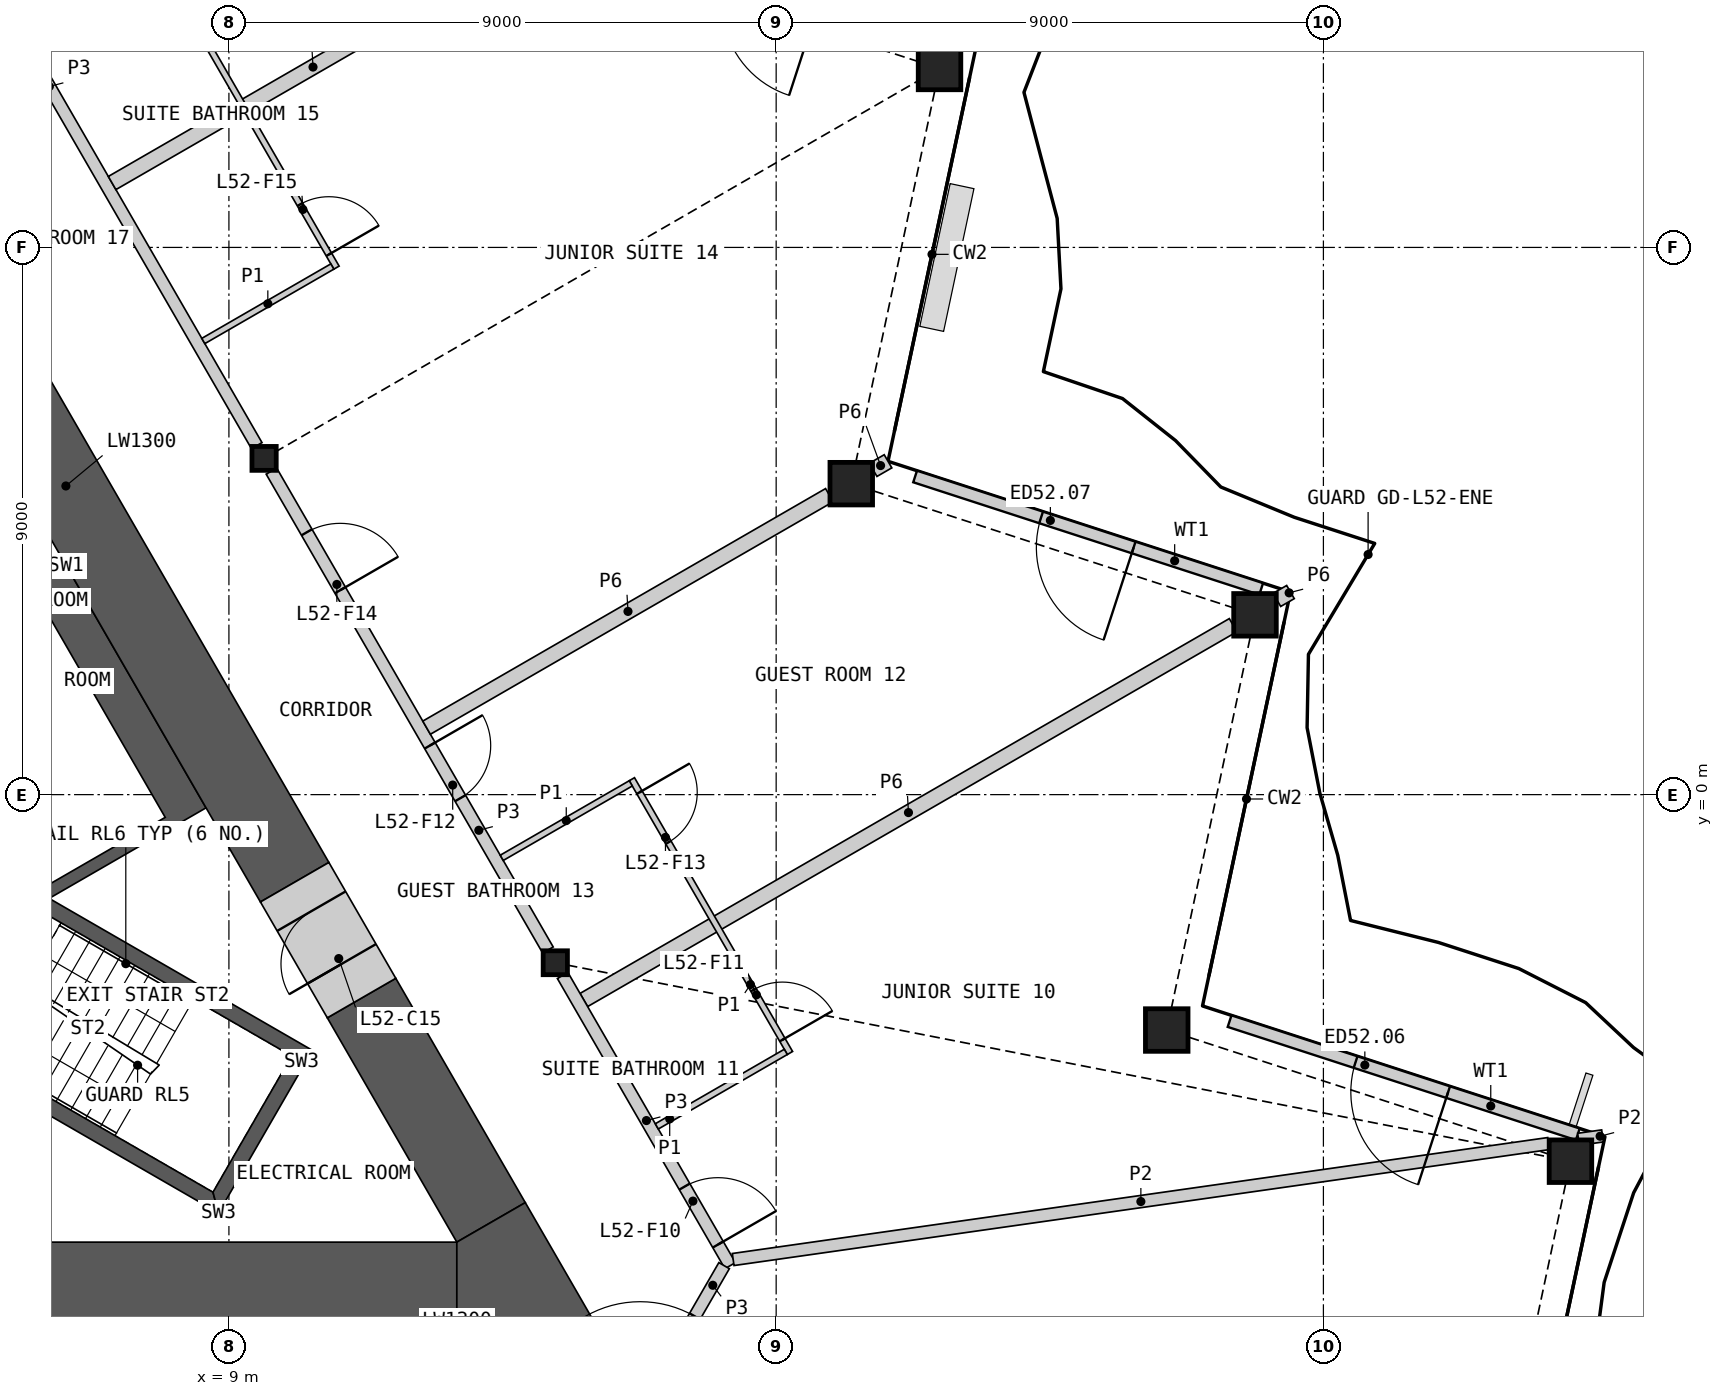
"""IFC4 building model, lengths in metres.
Left out: names, types, materials, properties, quantities, classifications, styles, units other than length and angle.
Written with IfcOpenShell. Run it as: python <this file> out.ifc"""

import sys

from ifc_helpers import new_model, si_unit, direction, frame, frame_2d, origin, origin_2d, place, context, subcontext, project, spatial, polyline, rectangle, hollow_rectangle, i_section, outline, extrude, element, fill, save


model = new_model("IFC4")
c1 = context("Model", 3, precision=1e-05, world=origin(), true_north=direction((0.0, 1.0)))
c2 = subcontext(c1, "Body", "Model", "MODEL_VIEW")
j1 = project(units=[si_unit("LENGTHUNIT", "METRE"), si_unit("PLANEANGLEUNIT", "RADIAN")], contexts=[c1])
p1 = place(None, origin())
s1 = spatial("IfcSite", under=j1, at=p1, CompositionType="ELEMENT")
p2 = place(p1, origin())
s2 = spatial("IfcBuilding", under=s1, at=p2, CompositionType="ELEMENT")
p3 = place(p2, frame((0.0, 0.0, 238.2)))
s3 = spatial("IfcBuildingStorey", under=s2, at=p3, CompositionType="ELEMENT", Elevation=238.2)
for number, where, z_axis, x_axis in (
    (1, (31.063, -6.029, 0.0), (0.0, 0.0, 1.0), (1.0, 0.0, 0.0)),
    (2, (24.423, -3.872, 0.0), (0.0, 0.0, 1.0), (1.0, 0.0, 0.0)),
    (3, (25.875, 2.957, 0.0), (0.0, 0.0, 1.0), (1.0, 0.0, 0.0)),
    (4, (19.235, 5.115, 0.0), (0.0, 0.0, 1.0), (1.0, 0.0, 0.0)),
    (5, (20.687, 11.943, 0.0), (0.0, 0.0, 1.0), (1.0, 0.0, 0.0)),
):
    element("IfcColumn", number, at=place(p3, frame(where, z_axis=z_axis, x_axis=x_axis)), inside=s3, PredefinedType="COLUMN", context=c2, shape_type="SweptSolid", body=[
        extrude(hollow_rectangle(XDim=0.7, YDim=0.7, WallThickness=0.045, at=origin_2d()), origin(), (0.0, 0.0, 1.0), 3.6),
    ])
for number, where, z_axis, x_axis in (
    (6, (14.368, -2.765, 0.0), (0.0, 0.0, 1.0), (1.0, 0.0, 0.0)),
    (7, (9.578, 5.53, 0.0), (0.0, 0.0, 1.0), (1.0, 0.0, 0.0)),
):
    element("IfcColumn", number, at=place(p3, frame(where, z_axis=z_axis, x_axis=x_axis)), inside=s3, PredefinedType="COLUMN", context=c2, shape_type="SweptSolid", body=[
        extrude(i_section(OverallWidth=0.399, OverallDepth=0.393, WebThickness=0.023, FlangeThickness=0.037, at=origin_2d()), origin(), (0.0, 0.0, 1.0), 3.6),
    ])
p4 = place(p3, frame((31.184, -5.586, 0.0), z_axis=(0.0, 0.0, 1.0), x_axis=(-0.95106415783, 0.30899347516, 0.0)))
e8 = element("IfcWall", 8, at=p4, inside=s3, PredefinedType="SOLIDWALL", context=c2, shape_type="SweptSolid", body=[
    extrude(rectangle(XDim=6.021, YDim=0.2, at=frame_2d((3.011, 0.0))), origin(), (0.0, 0.0, 1.0), 2.701),
])
p5 = place(p4, frame((2.243, 0.0, 0.0)))
e9 = element("IfcOpeningElement", 9, at=p5, cuts=e8, PredefinedType="OPENING", context=c2, shape_type="SweptSolid", body=[
    extrude(rectangle(XDim=1.6, YDim=2.4, at=frame_2d((0.8, 1.2))), frame((0.0, 0.11, 0.0), z_axis=(0.0, -1.0, 0.0), x_axis=(1.0, 0.0, 0.0)), (0.0, 0.0, 1.0), 0.22),
])
p6 = place(p3, frame((25.977, 3.383, 0.0), z_axis=(0.0, 0.0, 1.0), x_axis=(-0.951062846307, 0.308997511922, 0.0)))
e10 = element("IfcWall", 10, at=p6, inside=s3, PredefinedType="SOLIDWALL", context=c2, shape_type="SweptSolid", body=[
    extrude(rectangle(XDim=5.984, YDim=0.2, at=frame_2d((2.992, 0.0))), origin(), (0.0, 0.0, 1.0), 2.701),
])
p7 = place(p6, frame((2.206, 0.0, 0.0)))
e11 = element("IfcOpeningElement", 11, at=p7, cuts=e10, PredefinedType="OPENING", context=c2, shape_type="SweptSolid", body=[
    extrude(rectangle(XDim=1.6, YDim=2.4, at=frame_2d((0.8, 1.2))), frame((0.0, 0.11, 0.0), z_axis=(0.0, -1.0, 0.0), x_axis=(1.0, 0.0, 0.0)), (0.0, 0.0, 1.0), 0.22),
])
p8 = place(p3, origin())
e12 = element("IfcWall", 12, at=p8, inside=s3, PredefinedType="SHEAR", context=c2, shape_type="SweptSolid", body=[
    extrude(outline(polyline([(6.324, 3.767), (8.624, -0.217), (8.231, -0.444), (6.061, -1.697), (5.96, -1.524), (7.952, -0.374), (5.852, 3.263), (3.861, 2.113), (3.76, 2.287), (5.931, 3.54), (6.324, 3.767)])), origin(), (0.0, 0.0, 1.0), 3.25),
])
p9 = place(p3, origin())
e13 = element("IfcWall", 13, at=p9, inside=s3, PredefinedType="SHEAR", context=c2, shape_type="SweptSolid", body=[
    extrude(outline(polyline([(3.763, -3.956), (8.83, -6.881), (8.738, -6.539), (3.888, -3.739), (3.763, -3.956)])), origin(), (0.0, 0.0, 1.0), 3.25),
])
p10 = place(p3, origin())
e14 = element("IfcWall", 14, at=p10, inside=s3, PredefinedType="SHEAR", context=c2, shape_type="SweptSolid", body=[
    extrude(outline(polyline([(8.83, -6.881), (10.374, -4.206), (10.032, -4.298), (8.738, -6.539), (8.83, -6.881)])), origin(), (0.0, 0.0, 1.0), 3.25),
])
p11 = place(p3, origin())
e15 = element("IfcWall", 15, at=p11, inside=s3, PredefinedType="SHEAR", context=c2, shape_type="SweptSolid", body=[
    extrude(outline(polyline([(10.032, -4.298), (10.374, -4.206), (5.307, -1.281), (5.182, -1.498), (10.032, -4.298)])), origin(), (0.0, 0.0, 1.0), 3.25),
])
p12 = place(p3, frame((-12.748, -8.01, 0.0), z_axis=(0.0, 0.0, 1.0), x_axis=(1.0, 0.0, 0.0)))
e16 = element("IfcWall", 16, at=p12, inside=s3, PredefinedType="SHEAR", context=c2, shape_type="SweptSolid", body=[
    extrude(rectangle(XDim=25.497, YDim=1.3, at=frame_2d((12.748, 0.0))), origin(), (0.0, 0.0, 1.0), 3.25),
])
p13 = place(p3, frame((10.081, -1.441, 0.0), z_axis=(0.0, 0.0, 1.0), x_axis=(-0.500012180433, 0.866018371294, 0.0)))
e17 = element("IfcWall", 17, at=p13, inside=s3, PredefinedType="SHEAR", context=c2, shape_type="SweptSolid", body=[
    extrude(rectangle(XDim=15.05, YDim=1.3, at=frame_2d((7.525, 0.0))), origin(), (0.0, 0.0, 1.0), 3.25),
])
p14 = place(p3, frame((13.311, -7.035, 0.0), z_axis=(0.0, 0.0, 1.0), x_axis=(-0.500003555838, 0.866023350811, 0.0)))
e18 = element("IfcWall", 18, at=p14, inside=s3, PredefinedType="SHEAR", context=c2, shape_type="SweptSolid", body=[
    extrude(rectangle(XDim=4.26, YDim=1.3, at=frame_2d((2.13, 0.0))), origin(), (0.0, 0.0, 1.0), 3.25),
])
p15 = place(p3, origin())
e19 = element("IfcWall", 19, at=p15, inside=s3, PredefinedType="SHEAR", context=c2, shape_type="SweptSolid", body=[
    extrude(outline(polyline([(12.748, -8.66), (12.748, -7.36), (13.874, -6.71), (15.0, -8.66), (12.748, -8.66)])), origin(), (0.0, 0.0, 1.0), 3.25),
])
p16 = place(p3, frame((11.181, -3.346, 0.0), z_axis=(0.0, 0.0, 1.0), x_axis=(-0.499946605688, 0.86605622881, 0.0)))
e20 = element("IfcWall", 20, at=p16, inside=s3, PredefinedType="SHEAR", context=c2, shape_type="SweptSolid", body=[
    extrude(rectangle(XDim=2.2, YDim=1.3, at=frame_2d((1.1, 0.0))), origin(), (0.0, 0.0, 1.0), 3.25),
])
p17 = place(p16, frame((0.65, 0.0, 0.0)))
e21 = element("IfcOpeningElement", 21, at=p17, cuts=e20, PredefinedType="OPENING", context=c2, shape_type="SweptSolid", body=[
    extrude(rectangle(XDim=1.0, YDim=2.1, at=frame_2d((0.5, 1.05))), frame((0.0, 0.66, 0.0), z_axis=(0.0, -1.0, 0.0), x_axis=(1.0, 0.0, 0.0)), (0.0, 0.0, 1.0), 1.32),
])
p18 = place(p3, frame((14.837, -3.378, 0.0), z_axis=(0.0, 0.0, 1.0), x_axis=(0.866021706022, 0.500006404657, 0.0)))
e22 = element("IfcWall", 22, at=p18, inside=s3, PredefinedType="PARTITIONING", context=c2, shape_type="SweptSolid", body=[
    extrude(rectangle(XDim=12.33, YDim=0.25, at=frame_2d((6.165, 0.0))), origin(), (0.0, 0.0, 1.0), 2.404),
])
p19 = place(p3, frame((9.699, 5.321, 0.0), z_axis=(0.0, 0.0, 1.0), x_axis=(0.49998193945, -0.866035830797, 0.0)))
e23 = element("IfcWall", 23, at=p19, inside=s3, PredefinedType="PARTITIONING", context=c2, shape_type="SweptSolid", body=[
    extrude(rectangle(XDim=9.094, YDim=0.2, at=frame_2d((4.547, 0.0))), origin(), (0.0, 0.0, 1.0), 3.25),
])
p20 = place(p19, frame((5.212, 0.0, 0.0)))
e24 = element("IfcOpeningElement", 24, at=p20, cuts=e23, PredefinedType="OPENING", context=c2, shape_type="SweptSolid", body=[
    extrude(rectangle(XDim=1.0, YDim=2.1, at=frame_2d((0.5, 1.05))), frame((0.0, 0.11, 0.0), z_axis=(0.0, -1.0, 0.0), x_axis=(1.0, 0.0, 0.0)), (0.0, 0.0, 1.0), 0.22),
])
p21 = place(p19, frame((1.162, 0.0, 0.0)))
e25 = element("IfcOpeningElement", 25, at=p21, cuts=e23, PredefinedType="OPENING", context=c2, shape_type="SweptSolid", body=[
    extrude(rectangle(XDim=1.1, YDim=2.1, at=frame_2d((0.55, 1.05))), frame((0.0, 0.11, 0.0), z_axis=(0.0, -1.0, 0.0), x_axis=(1.0, 0.0, 0.0)), (0.0, 0.0, 1.0), 0.22),
])
p22 = place(p3, frame((4.91, 13.616, 0.0), z_axis=(0.0, 0.0, 1.0), x_axis=(0.50000207303, -0.866024206917, 0.0)))
e26 = element("IfcWall", 26, at=p22, inside=s3, PredefinedType="PARTITIONING", context=c2, shape_type="SweptSolid", body=[
    extrude(rectangle(XDim=9.095, YDim=0.2, at=frame_2d((4.547, 0.0))), origin(), (0.0, 0.0, 1.0), 3.25),
])
p23 = place(p3, frame((12.251, 1.101, 0.0), z_axis=(0.0, 0.0, 1.0), x_axis=(0.866020808234, 0.500007959642, 0.0)))
e27 = element("IfcWall", 27, at=p23, inside=s3, PredefinedType="PARTITIONING", context=c2, shape_type="SweptSolid", body=[
    extrude(rectangle(XDim=7.649, YDim=0.25, at=frame_2d((3.824, 0.0))), origin(), (0.0, 0.0, 1.0), 2.404),
])
p24 = place(p3, frame((7.079, 10.059, 0.0), z_axis=(0.0, 0.0, 1.0), x_axis=(0.866033195618, 0.499986503906, 0.0)))
e28 = element("IfcWall", 28, at=p24, inside=s3, PredefinedType="PARTITIONING", context=c2, shape_type="SweptSolid", body=[
    extrude(rectangle(XDim=7.63, YDim=0.25, at=frame_2d((3.815, 0.0))), origin(), (0.0, 0.0, 1.0), 2.404),
])
p25 = place(p3, frame((14.489, -2.975, 0.0), z_axis=(0.0, 0.0, 1.0), x_axis=(0.500017753321, -0.866015153657, 0.0)))
e29 = element("IfcWall", 29, at=p25, inside=s3, PredefinedType="PARTITIONING", context=c2, shape_type="SweptSolid", body=[
    extrude(rectangle(XDim=5.51, YDim=0.2, at=frame_2d((2.755, 0.0))), origin(), (0.0, 0.0, 1.0), 3.25),
])
p26 = place(p25, frame((4.01, 0.0, 0.0)))
e30 = element("IfcOpeningElement", 30, at=p26, cuts=e29, PredefinedType="OPENING", context=c2, shape_type="SweptSolid", body=[
    extrude(rectangle(XDim=1.1, YDim=2.1, at=frame_2d((0.55, 1.05))), frame((0.0, 0.11, 0.0), z_axis=(0.0, -1.0, 0.0), x_axis=(1.0, 0.0, 0.0)), (0.0, 0.0, 1.0), 0.22),
])
p27 = place(p3, frame((15.281, -10.974, 0.0), z_axis=(0.0, 0.0, 1.0), x_axis=(0.499958791762, 0.866049194065, 0.0)))
e31 = element("IfcWall", 31, at=p27, inside=s3, PredefinedType="PARTITIONING", context=c2, shape_type="SweptSolid", body=[
    extrude(rectangle(XDim=3.726, YDim=0.2, at=frame_2d((1.863, 0.0))), origin(), (0.0, 0.0, 1.0), 3.25),
])
p28 = place(p27, frame((0.963, 0.0, 0.0)))
e32 = element("IfcOpeningElement", 32, at=p28, cuts=e31, PredefinedType="OPENING", context=c2, shape_type="SweptSolid", body=[
    extrude(rectangle(XDim=1.8, YDim=2.1, at=frame_2d((0.9, 1.05))), frame((0.0, 0.11, 0.0), z_axis=(0.0, -1.0, 0.0), x_axis=(1.0, 0.0, 0.0)), (0.0, 0.0, 1.0), 0.22),
])
p29 = place(p3, frame((19.595, 5.341, 0.0), z_axis=(0.0, 0.0, 1.0), x_axis=(0.865998287773, 0.500046963369, 0.0)))
e33 = element("IfcWall", 33, at=p29, inside=s3, PredefinedType="PARTITIONING", context=c2, shape_type="SweptSolid", body=[
    extrude(rectangle(XDim=0.282, YDim=0.25, at=frame_2d((0.141, 0.0))), origin(), (0.0, 0.0, 1.0), 2.404),
])
p30 = place(p3, frame((26.235, 3.203, 0.0), z_axis=(0.0, 0.0, 1.0), x_axis=(0.86596515875, 0.500104332946, 0.0)))
e34 = element("IfcWall", 34, at=p30, inside=s3, PredefinedType="PARTITIONING", context=c2, shape_type="SweptSolid", body=[
    extrude(rectangle(XDim=0.258, YDim=0.25, at=frame_2d((0.129, 0.0))), origin(), (0.0, 0.0, 1.0), 2.404),
])
p31 = place(p3, frame((17.293, -7.646, 0.0), z_axis=(0.0, 0.0, 1.0), x_axis=(0.990042285303, 0.140770285614, 0.0)))
e35 = element("IfcWall", 35, at=p31, inside=s3, PredefinedType="PARTITIONING", context=c2, shape_type="SweptSolid", body=[
    extrude(rectangle(XDim=13.545, YDim=0.2, at=frame_2d((6.772, 0.0))), origin(), (0.0, 0.0, 1.0), 2.404),
])
p32 = place(p3, frame((31.196, -5.669, 0.0), z_axis=(0.0, 0.0, 1.0), x_axis=(0.990010701632, 0.140992236146, 0.0)))
e36 = element("IfcWall", 36, at=p32, inside=s3, PredefinedType="PARTITIONING", context=c2, shape_type="SweptSolid", body=[
    extrude(rectangle(XDim=0.398, YDim=0.2, at=frame_2d((0.199, 0.0))), origin(), (0.0, 0.0, 1.0), 2.404),
])
p33 = place(p3, frame((7.719, 13.95, 0.0), z_axis=(0.0, 0.0, 1.0), x_axis=(0.500008851346, -0.866020293397, 0.0)))
e37 = element("IfcWall", 37, at=p33, inside=s3, PredefinedType="PARTITIONING", context=c2, shape_type="SweptSolid", body=[
    extrude(rectangle(XDim=6.1, YDim=0.1, at=frame_2d((3.05, 0.0))), origin(), (0.0, 0.0, 1.0), 2.404),
])
p34 = place(p33, frame((4.9, 0.0, 0.0)))
e38 = element("IfcOpeningElement", 38, at=p34, cuts=e37, PredefinedType="OPENING", context=c2, shape_type="SweptSolid", body=[
    extrude(rectangle(XDim=0.95, YDim=2.1, at=frame_2d((0.475, 1.05))), frame((0.0, 0.06, 0.0), z_axis=(0.0, -1.0, 0.0), x_axis=(1.0, 0.0, 0.0)), (0.0, 0.0, 1.0), 0.12),
])
p35 = place(p33, frame((0.25, 0.0, 0.0)))
e39 = element("IfcOpeningElement", 39, at=p35, cuts=e37, PredefinedType="OPENING", context=c2, shape_type="SweptSolid", body=[
    extrude(rectangle(XDim=0.95, YDim=2.1, at=frame_2d((0.475, 1.05))), frame((0.0, 0.06, 0.0), z_axis=(0.0, -1.0, 0.0), x_axis=(1.0, 0.0, 0.0)), (0.0, 0.0, 1.0), 0.12),
])
p36 = place(p3, frame((15.627, 0.254, 0.0), z_axis=(0.0, 0.0, 1.0), x_axis=(0.500027264788, -0.866009661879, 0.0)))
e40 = element("IfcWall", 40, at=p36, inside=s3, PredefinedType="PARTITIONING", context=c2, shape_type="SweptSolid", body=[
    extrude(rectangle(XDim=5.2, YDim=0.1, at=frame_2d((2.6, 0.0))), origin(), (0.0, 0.0, 1.0), 2.404),
])
p37 = place(p36, frame((4.0, 0.0, 0.0)))
e41 = element("IfcOpeningElement", 41, at=p37, cuts=e40, PredefinedType="OPENING", context=c2, shape_type="SweptSolid", body=[
    extrude(rectangle(XDim=0.95, YDim=2.1, at=frame_2d((0.475, 1.05))), frame((0.0, 0.06, 0.0), z_axis=(0.0, -1.0, 0.0), x_axis=(1.0, 0.0, 0.0)), (0.0, 0.0, 1.0), 0.12),
])
p38 = place(p36, frame((0.25, 0.0, 0.0)))
e42 = element("IfcOpeningElement", 42, at=p38, cuts=e40, PredefinedType="OPENING", context=c2, shape_type="SweptSolid", body=[
    extrude(rectangle(XDim=0.95, YDim=2.1, at=frame_2d((0.475, 1.05))), frame((0.0, 0.06, 0.0), z_axis=(0.0, -1.0, 0.0), x_axis=(1.0, 0.0, 0.0)), (0.0, 0.0, 1.0), 0.12),
])
p39 = place(p3, frame((16.037, -5.456, 0.0), z_axis=(0.0, 0.0, 1.0), x_axis=(0.865989751695, 0.500061746146, 0.0)))
e43 = element("IfcWall", 43, at=p39, inside=s3, PredefinedType="PARTITIONING", context=c2, shape_type="SweptSolid", body=[
    extrude(rectangle(XDim=2.45, YDim=0.1, at=frame_2d((1.225, 0.0))), origin(), (0.0, 0.0, 1.0), 2.404),
])
p40 = place(p3, frame((13.487, -1.04, 0.0), z_axis=(0.0, 0.0, 1.0), x_axis=(0.866032905446, 0.499987006516, 0.0)))
e44 = element("IfcWall", 44, at=p40, inside=s3, PredefinedType="PARTITIONING", context=c2, shape_type="SweptSolid", body=[
    extrude(rectangle(XDim=2.45, YDim=0.1, at=frame_2d((1.225, 0.0))), origin(), (0.0, 0.0, 1.0), 2.404),
])
p41 = place(p3, frame((8.579, 7.461, 0.0), z_axis=(0.0, 0.0, 1.0), x_axis=(0.866014668023, 0.500018594424, 0.0)))
e45 = element("IfcWall", 45, at=p41, inside=s3, PredefinedType="PARTITIONING", context=c2, shape_type="SweptSolid", body=[
    extrude(rectangle(XDim=2.45, YDim=0.1, at=frame_2d((1.225, 0.0))), origin(), (0.0, 0.0, 1.0), 2.404),
])
p42 = place(p5, origin())
e46 = element("IfcDoor", 46, at=p42, inside=s3, OperationType="DOUBLE_DOOR_SINGLE_SWING", PredefinedType="DOOR", context=c2, shape_type="SweptSolid", body=[
    extrude(rectangle(XDim=1.6, YDim=2.4, at=frame_2d((0.8, 1.2))), frame((0.0, 0.025, 0.0), z_axis=(0.0, -1.0, 0.0), x_axis=(1.0, 0.0, 0.0)), (0.0, 0.0, 1.0), 0.05),
])
fill(e9, e46)
p43 = place(p7, origin())
e47 = element("IfcDoor", 47, at=p43, inside=s3, OperationType="DOUBLE_DOOR_SINGLE_SWING", PredefinedType="DOOR", context=c2, shape_type="SweptSolid", body=[
    extrude(rectangle(XDim=1.6, YDim=2.4, at=frame_2d((0.8, 1.2))), frame((0.0, 0.025, 0.0), z_axis=(0.0, -1.0, 0.0), x_axis=(1.0, 0.0, 0.0)), (0.0, 0.0, 1.0), 0.05),
])
fill(e11, e47)
p44 = place(p17, origin())
e48 = element("IfcDoor", 48, at=p44, inside=s3, OperationType="SINGLE_SWING_LEFT", PredefinedType="DOOR", context=c2, shape_type="SweptSolid", body=[
    extrude(rectangle(XDim=1.0, YDim=2.1, at=frame_2d((0.5, 1.05))), frame((0.0, 0.405, 0.0), z_axis=(0.0, -1.0, 0.0), x_axis=(1.0, 0.0, 0.0)), (0.0, 0.0, 1.0), 0.05),
])
fill(e21, e48)
p45 = place(p28, origin())
e49 = element("IfcDoor", 49, at=p45, inside=s3, OperationType="DOUBLE_DOOR_SINGLE_SWING", PredefinedType="DOOR", context=c2, shape_type="SweptSolid", body=[
    extrude(rectangle(XDim=1.8, YDim=2.1, at=frame_2d((0.9, 1.05))), frame((0.0, 0.025, 0.0), z_axis=(0.0, -1.0, 0.0), x_axis=(1.0, 0.0, 0.0)), (0.0, 0.0, 1.0), 0.05),
])
fill(e32, e49)
p46 = place(p26, origin())
e50 = element("IfcDoor", 50, at=p46, inside=s3, OperationType="SINGLE_SWING_RIGHT", PredefinedType="DOOR", context=c2, shape_type="SweptSolid", body=[
    extrude(rectangle(XDim=1.1, YDim=2.1, at=frame_2d((0.55, 1.05))), frame((0.0, 0.025, 0.0), z_axis=(0.0, -1.0, 0.0), x_axis=(1.0, 0.0, 0.0)), (0.0, 0.0, 1.0), 0.05),
])
fill(e30, e50)
p47 = place(p37, origin())
e51 = element("IfcDoor", 51, at=p47, inside=s3, OperationType="SINGLE_SWING_RIGHT", PredefinedType="DOOR", context=c2, shape_type="SweptSolid", body=[
    extrude(rectangle(XDim=0.95, YDim=2.1, at=frame_2d((0.475, 1.05))), frame((0.0, 0.025, 0.0), z_axis=(0.0, -1.0, 0.0), x_axis=(1.0, 0.0, 0.0)), (0.0, 0.0, 1.0), 0.05),
])
fill(e41, e51)
p48 = place(p20, origin())
e52 = element("IfcDoor", 52, at=p48, inside=s3, OperationType="SINGLE_SWING_LEFT", PredefinedType="DOOR", context=c2, shape_type="SweptSolid", body=[
    extrude(rectangle(XDim=1.0, YDim=2.1, at=frame_2d((0.5, 1.05))), frame((0.0, 0.025, 0.0), z_axis=(0.0, -1.0, 0.0), x_axis=(1.0, 0.0, 0.0)), (0.0, 0.0, 1.0), 0.05),
])
fill(e24, e52)
p49 = place(p38, origin())
e53 = element("IfcDoor", 53, at=p49, inside=s3, OperationType="SINGLE_SWING_LEFT", PredefinedType="DOOR", context=c2, shape_type="SweptSolid", body=[
    extrude(rectangle(XDim=0.95, YDim=2.1, at=frame_2d((0.475, 1.05))), frame((0.0, 0.025, 0.0), z_axis=(0.0, -1.0, 0.0), x_axis=(1.0, 0.0, 0.0)), (0.0, 0.0, 1.0), 0.05),
])
fill(e42, e53)
p50 = place(p21, origin())
e54 = element("IfcDoor", 54, at=p50, inside=s3, OperationType="SINGLE_SWING_RIGHT", PredefinedType="DOOR", context=c2, shape_type="SweptSolid", body=[
    extrude(rectangle(XDim=1.1, YDim=2.1, at=frame_2d((0.55, 1.05))), frame((0.0, 0.025, 0.0), z_axis=(0.0, -1.0, 0.0), x_axis=(1.0, 0.0, 0.0)), (0.0, 0.0, 1.0), 0.05),
])
fill(e25, e54)
p51 = place(p34, origin())
e55 = element("IfcDoor", 55, at=p51, inside=s3, OperationType="SINGLE_SWING_RIGHT", PredefinedType="DOOR", context=c2, shape_type="SweptSolid", body=[
    extrude(rectangle(XDim=0.95, YDim=2.1, at=frame_2d((0.475, 1.05))), frame((0.0, 0.025, 0.0), z_axis=(0.0, -1.0, 0.0), x_axis=(1.0, 0.0, 0.0)), (0.0, 0.0, 1.0), 0.05),
])
fill(e38, e55)
save(model, sys.argv[1])
